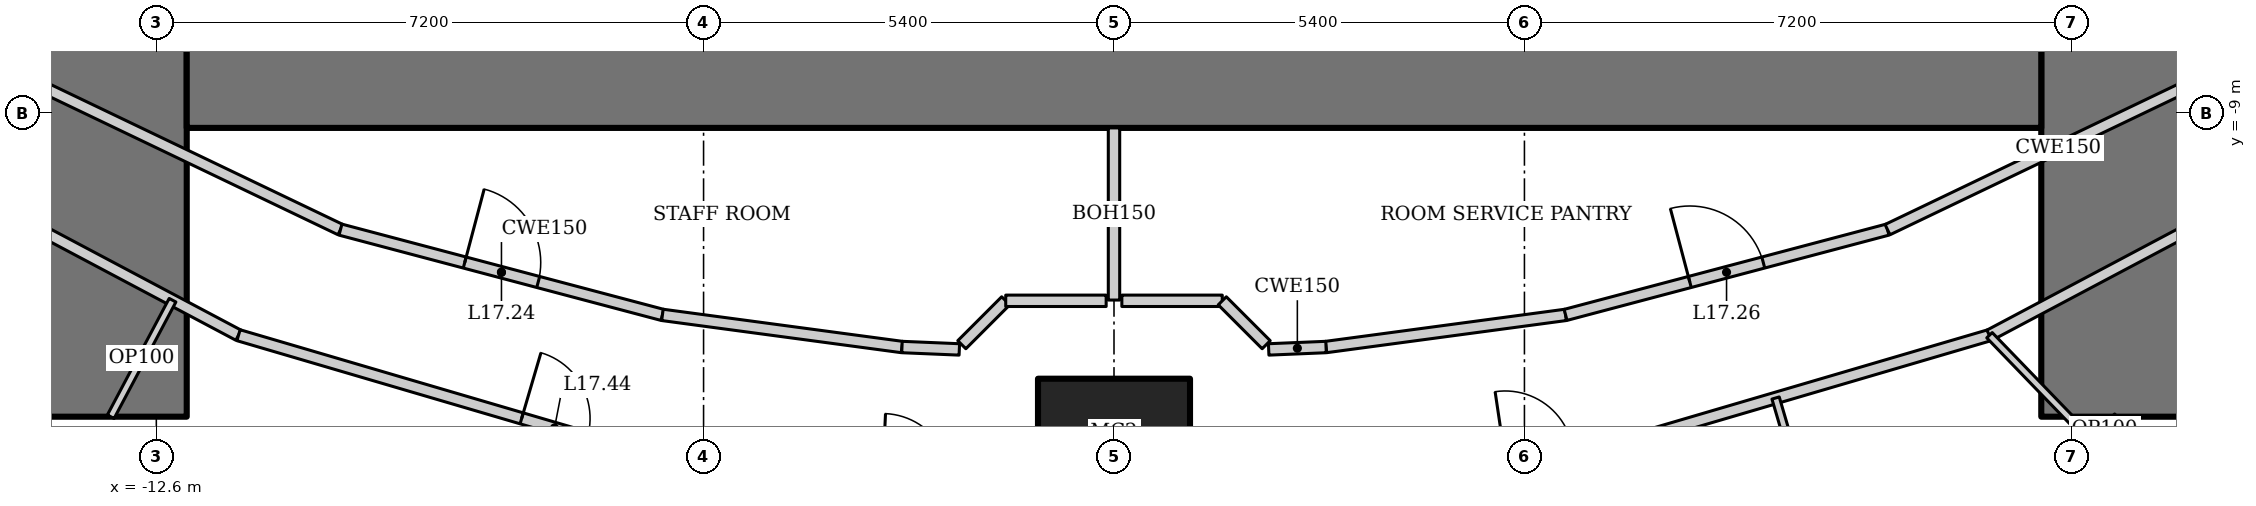
"""IFC4 building model, lengths in metres.
Left out: names, types, materials, properties, quantities, classifications, styles, units other than length and angle.
Written with IfcOpenShell. Run it as: python <this file> out.ifc"""

import sys

from ifc_helpers import new_model, si_unit, direction, frame, frame_2d, origin, origin_2d, place, context, subcontext, project, spatial, rectangle, hollow_rectangle, extrude, element, fill, save


model = new_model("IFC4")
c1 = context("Model", 3, precision=1e-05, world=origin(), true_north=direction((0.0, 1.0)))
c2 = subcontext(c1, "Body", "Model", "MODEL_VIEW")
j1 = project(units=[si_unit("LENGTHUNIT", "METRE"), si_unit("PLANEANGLEUNIT", "RADIAN")], contexts=[c1])
p1 = place(None, origin())
s1 = spatial("IfcSite", under=j1, at=p1, CompositionType="ELEMENT")
p2 = place(p1, origin())
s2 = spatial("IfcBuilding", under=s1, at=p2, CompositionType="ELEMENT")
p3 = place(p2, frame((0.0, 0.0, 76.6)))
s3 = spatial("IfcBuildingStorey", under=s2, at=p3, CompositionType="ELEMENT", Elevation=76.6)
p4 = place(p3, frame((0.0, -13.5, 0.0), z_axis=(0.0, 0.0, 1.0), x_axis=(1.0, 0.0, 0.0)))
e1 = element("IfcColumn", 1, at=p4, inside=s3, PredefinedType="COLUMN", context=c2, shape_type="SweptSolid", body=[
    extrude(hollow_rectangle(XDim=2.0, YDim=2.0, WallThickness=0.17, at=origin_2d()), origin(), (0.0, 0.0, 1.0), 3.6),
])
p5 = place(p3, frame((13.2, -13.0, 0.0), z_axis=(0.0, 0.0, 1.0), x_axis=(0.0, 1.0, 0.0)))
e2 = element("IfcWall", 2, at=p5, inside=s3, PredefinedType="SHEAR", context=c2, shape_type="SweptSolid", body=[
    extrude(rectangle(XDim=26.0, YDim=2.0, at=frame_2d((13.0, 0.0))), origin(), (0.0, 0.0, 1.0), 3.6),
])
p6 = place(p5, frame((12.1, 0.0, 0.0)))
e3 = element("IfcOpeningElement", 3, at=p6, cuts=e2, PredefinedType="OPENING", context=c2, shape_type="SweptSolid", body=[
    extrude(rectangle(XDim=1.8, YDim=2.1, at=frame_2d((0.9, 1.05))), frame((0.0, 1.01, 0.0), z_axis=(0.0, -1.0, 0.0), x_axis=(1.0, 0.0, 0.0)), (0.0, 0.0, 1.0), 2.02),
])
p7 = place(p3, frame((-13.2, 13.0, 0.0), z_axis=(0.0, 0.0, 1.0), x_axis=(0.0, -1.0, 0.0)))
e4 = element("IfcWall", 4, at=p7, inside=s3, PredefinedType="SHEAR", context=c2, shape_type="SweptSolid", body=[
    extrude(rectangle(XDim=26.0, YDim=2.0, at=frame_2d((13.0, 0.0))), origin(), (0.0, 0.0, 1.0), 3.6),
])
p8 = place(p7, frame((12.1, 0.0, 0.0)))
e5 = element("IfcOpeningElement", 5, at=p8, cuts=e4, PredefinedType="OPENING", context=c2, shape_type="SweptSolid", body=[
    extrude(rectangle(XDim=1.8, YDim=2.1, at=frame_2d((0.9, 1.05))), frame((0.0, 1.01, 0.0), z_axis=(0.0, -1.0, 0.0), x_axis=(1.0, 0.0, 0.0)), (0.0, 0.0, 1.0), 2.02),
])
p9 = place(p3, frame((-12.2, -8.0, 0.0), z_axis=(0.0, 0.0, 1.0), x_axis=(1.0, 0.0, 0.0)))
e6 = element("IfcWall", 6, at=p9, inside=s3, PredefinedType="SHEAR", context=c2, shape_type="SweptSolid", body=[
    extrude(rectangle(XDim=24.4, YDim=2.4, at=frame_2d((12.2, 0.0))), origin(), (0.0, 0.0, 1.0), 3.6),
])
p10 = place(p3, frame((-16.369, -9.354, 0.0), z_axis=(0.0, 0.0, 1.0), x_axis=(0.883334368785, -0.468743419071, 0.0)))
e7 = element("IfcWall", 7, at=p10, inside=s3, PredefinedType="PARTITIONING", context=c2, shape_type="SweptSolid", body=[
    extrude(rectangle(XDim=5.491, YDim=0.15, at=frame_2d((2.746, 0.0))), origin(), (0.0, 0.0, 1.0), 3.45),
])
p11 = place(p3, frame((-11.519, -11.928, 0.0), z_axis=(0.0, 0.0, 1.0), x_axis=(0.959496227294, -0.281721475589, 0.0)))
e8 = element("IfcWall", 8, at=p11, inside=s3, PredefinedType="PARTITIONING", context=c2, shape_type="SweptSolid", body=[
    extrude(rectangle(XDim=4.933, YDim=0.15, at=frame_2d((2.466, 0.0))), origin(), (0.0, 0.0, 1.0), 3.45),
])
p12 = place(p11, frame((3.883, 0.0, 0.0)))
e9 = element("IfcOpeningElement", 9, at=p12, cuts=e8, PredefinedType="OPENING", context=c2, shape_type="SweptSolid", body=[
    extrude(rectangle(XDim=0.9, YDim=2.1, at=frame_2d((0.45, 1.05))), frame((0.0, 0.085, 0.0), z_axis=(0.0, -1.0, 0.0), x_axis=(1.0, 0.0, 0.0)), (0.0, 0.0, 1.0), 0.17),
])
p13 = place(p3, frame((6.786, -13.317, 0.0), z_axis=(0.0, 0.0, 1.0), x_axis=(0.959496227294, 0.281721475589, 0.0)))
e10 = element("IfcWall", 10, at=p13, inside=s3, PredefinedType="PARTITIONING", context=c2, shape_type="SweptSolid", body=[
    extrude(rectangle(XDim=4.933, YDim=0.15, at=frame_2d((2.466, 0.0))), origin(), (0.0, 0.0, 1.0), 3.45),
])
p14 = place(p3, frame((11.519, -11.928, 0.0), z_axis=(0.0, 0.0, 1.0), x_axis=(0.883334368785, 0.468743419071, 0.0)))
e11 = element("IfcWall", 11, at=p14, inside=s3, PredefinedType="PARTITIONING", context=c2, shape_type="SweptSolid", body=[
    extrude(rectangle(XDim=5.491, YDim=0.15, at=frame_2d((2.746, 0.0))), origin(), (0.0, 0.0, 1.0), 3.45),
])
p15 = place(p3, frame((-14.673, -8.385, 0.0), z_axis=(0.0, 0.0, 1.0), x_axis=(0.901869692799, -0.43200816799, 0.0)))
e12 = element("IfcWall", 12, at=p15, inside=s3, PredefinedType="PARTITIONING", context=c2, shape_type="SweptSolid", body=[
    extrude(rectangle(XDim=4.986, YDim=0.15, at=frame_2d((2.493, 0.0))), origin(), (0.0, 0.0, 1.0), 3.45),
])
p16 = place(p3, frame((-10.177, -10.539, 0.0), z_axis=(0.0, 0.0, 1.0), x_axis=(0.966672790407, -0.256015070428, 0.0)))
e13 = element("IfcWall", 13, at=p16, inside=s3, PredefinedType="PARTITIONING", context=c2, shape_type="SweptSolid", body=[
    extrude(rectangle(XDim=4.382, YDim=0.15, at=frame_2d((2.191, 0.0))), origin(), (0.0, 0.0, 1.0), 3.45),
])
p17 = place(p16, frame((1.691, 0.0, 0.0)))
e14 = element("IfcOpeningElement", 14, at=p17, cuts=e13, PredefinedType="OPENING", context=c2, shape_type="SweptSolid", body=[
    extrude(rectangle(XDim=1.0, YDim=2.1, at=frame_2d((0.5, 1.05))), frame((0.0, 0.085, 0.0), z_axis=(0.0, -1.0, 0.0), x_axis=(1.0, 0.0, 0.0)), (0.0, 0.0, 1.0), 0.17),
])
for number, where, z_axis, x_axis in (
    (15, (-5.941, -11.66, 0.0), (0.0, 0.0, 1.0), (0.991, -0.133, 0.0)),
    (16, (2.79, -12.083, 0.0), (0.0, 0.0, 1.0), (0.991, 0.133, 0.0)),
):
    element("IfcWall", number, at=place(p3, frame(where, z_axis=z_axis, x_axis=x_axis)), inside=s3, PredefinedType="PARTITIONING", context=c2, shape_type="SweptSolid", body=[
        extrude(rectangle(XDim=3.18, YDim=0.15, at=frame_2d((1.59, 0.0))), origin(), (0.0, 0.0, 1.0), 3.45),
    ])
p18 = place(p3, frame((5.941, -11.66, 0.0), z_axis=(0.0, 0.0, 1.0), x_axis=(0.966672790407, 0.256015070428, 0.0)))
e17 = element("IfcWall", 17, at=p18, inside=s3, PredefinedType="PARTITIONING", context=c2, shape_type="SweptSolid", body=[
    extrude(rectangle(XDim=4.382, YDim=0.15, at=frame_2d((2.191, 0.0))), origin(), (0.0, 0.0, 1.0), 3.45),
])
p19 = place(p18, frame((1.691, 0.0, 0.0)))
e18 = element("IfcOpeningElement", 18, at=p19, cuts=e17, PredefinedType="OPENING", context=c2, shape_type="SweptSolid", body=[
    extrude(rectangle(XDim=1.0, YDim=2.1, at=frame_2d((0.5, 1.05))), frame((0.0, 0.085, 0.0), z_axis=(0.0, -1.0, 0.0), x_axis=(1.0, 0.0, 0.0)), (0.0, 0.0, 1.0), 0.17),
])
p20 = place(p3, frame((10.177, -10.539, 0.0), z_axis=(0.0, 0.0, 1.0), x_axis=(0.901869692799, 0.43200816799, 0.0)))
e19 = element("IfcWall", 19, at=p20, inside=s3, PredefinedType="PARTITIONING", context=c2, shape_type="SweptSolid", body=[
    extrude(rectangle(XDim=4.986, YDim=0.15, at=frame_2d((2.493, 0.0))), origin(), (0.0, 0.0, 1.0), 3.45),
])
p21 = place(p3, frame((8.705, -12.754, 0.0), z_axis=(0.0, 0.0, 1.0), x_axis=(0.281659633817, -0.959514382736, 0.0)))
e20 = element("IfcWall", 20, at=p21, inside=s3, PredefinedType="PARTITIONING", context=c2, shape_type="SweptSolid", body=[
    extrude(rectangle(XDim=2.4, YDim=0.1, at=frame_2d((1.2, 0.0))), origin(), (0.0, 0.0, 1.0), 3.45),
])
p22 = place(p21, frame((0.7, 0.0, 0.0)))
e21 = element("IfcOpeningElement", 21, at=p22, cuts=e20, PredefinedType="OPENING", context=c2, shape_type="SweptSolid", body=[
    extrude(rectangle(XDim=0.8, YDim=2.1, at=frame_2d((0.4, 1.05))), frame((0.0, 0.06, 0.0), z_axis=(0.0, -1.0, 0.0), x_axis=(1.0, 0.0, 0.0)), (0.0, 0.0, 1.0), 0.12),
])
p23 = place(p3, frame((16.944, -17.545, 0.0), z_axis=(0.0, 0.0, 1.0), x_axis=(-0.694666479492, 0.719331969448, 0.0)))
e22 = element("IfcWall", 22, at=p23, inside=s3, PredefinedType="PARTITIONING", context=c2, shape_type="SweptSolid", body=[
    extrude(rectangle(XDim=7.81, YDim=0.1, at=frame_2d((3.905, 0.0))), origin(), (0.0, 0.0, 1.0), 2.528),
])
p24 = place(p23, frame((3.455, 0.0, 0.0)))
e23 = element("IfcOpeningElement", 23, at=p24, cuts=e22, PredefinedType="OPENING", context=c2, shape_type="SweptSolid", body=[
    extrude(rectangle(XDim=0.9, YDim=2.1, at=frame_2d((0.45, 1.05))), frame((0.0, 0.06, 0.0), z_axis=(0.0, -1.0, 0.0), x_axis=(1.0, 0.0, 0.0)), (0.0, 0.0, 1.0), 0.12),
])
p25 = place(p3, frame((13.2, -13.0, 0.0), z_axis=(0.0, 0.0, 1.0), x_axis=(-0.719347134512, -0.69465077562, 0.0)))
e24 = element("IfcWall", 24, at=p25, inside=s3, PredefinedType="PARTITIONING", context=c2, shape_type="SweptSolid", body=[
    extrude(rectangle(XDim=0.465, YDim=0.1, at=frame_2d((0.232, 0.0))), origin(), (0.0, 0.0, 1.0), 3.45),
])
p26 = place(p3, frame((-13.2, -13.0, 0.0), z_axis=(0.0, 0.0, 1.0), x_axis=(0.46874717052, 0.88333237806, 0.0)))
e25 = element("IfcWall", 25, at=p26, inside=s3, PredefinedType="PARTITIONING", context=c2, shape_type="SweptSolid", body=[
    extrude(rectangle(XDim=1.735, YDim=0.1, at=frame_2d((0.868, 0.0))), origin(), (0.0, 0.0, 1.0), 3.45),
])
for number, where, z_axis, x_axis in (
    (26, (-2.79, -12.083, 0.0), (0.0, 0.0, 1.0), (0.999, -0.042, 0.0)),
    (27, (2.035, -12.115, 0.0), (0.0, 0.0, 1.0), (0.999, 0.042, 0.0)),
):
    element("IfcWall", number, at=place(p3, frame(where, z_axis=z_axis, x_axis=x_axis)), inside=s3, PredefinedType="PARTITIONING", context=c2, shape_type="SweptSolid", body=[
        extrude(rectangle(XDim=0.755, YDim=0.15, at=frame_2d((0.378, 0.0))), origin(), (0.0, 0.0, 1.0), 3.45),
    ])
p27 = place(p3, frame((0.0, -9.2, 0.0), z_axis=(0.0, 0.0, 1.0), x_axis=(0.0, -1.0, 0.0)))
e28 = element("IfcWall", 28, at=p27, inside=s3, PredefinedType="PARTITIONING", context=c2, shape_type="SweptSolid", body=[
    extrude(rectangle(XDim=2.265, YDim=0.15, at=frame_2d((1.133, 0.0))), origin(), (0.0, 0.0, 1.0), 3.043),
])
p28 = place(p3, frame((-2.002, -12.053, 0.0), z_axis=(0.0, 0.0, 1.0), x_axis=(0.707256164678, 0.706957366129, 0.0)))
e29 = element("IfcWall", 29, at=p28, inside=s3, PredefinedType="PARTITIONING", context=c2, shape_type="SweptSolid", body=[
    extrude(rectangle(XDim=0.817, YDim=0.15, at=frame_2d((0.409, 0.0))), origin(), (0.0, 0.0, 1.0), 3.45),
])
for number, where, z_axis, x_axis in (
    (30, (-1.425, -11.475, 0.0), (0.0, 0.0, 1.0), (1.0, 0.0, 0.0)),
    (31, (0.103, -11.475, 0.0), (0.0, 0.0, 1.0), (1.0, 0.0, 0.0)),
):
    element("IfcWall", number, at=place(p3, frame(where, z_axis=z_axis, x_axis=x_axis)), inside=s3, PredefinedType="PARTITIONING", context=c2, shape_type="SweptSolid", body=[
        extrude(rectangle(XDim=1.321, YDim=0.15, at=frame_2d((0.661, 0.0))), origin(), (0.0, 0.0, 1.0), 3.45),
    ])
p29 = place(p3, frame((1.425, -11.475, 0.0), z_axis=(0.0, 0.0, 1.0), x_axis=(0.707256164678, -0.706957366129, 0.0)))
e32 = element("IfcWall", 32, at=p29, inside=s3, PredefinedType="PARTITIONING", context=c2, shape_type="SweptSolid", body=[
    extrude(rectangle(XDim=0.817, YDim=0.15, at=frame_2d((0.409, 0.0))), origin(), (0.0, 0.0, 1.0), 3.45),
])
p30 = place(p17, origin())
e33 = element("IfcDoor", 33, at=p30, inside=s3, OperationType="SINGLE_SWING_LEFT", PredefinedType="DOOR", context=c2, shape_type="SweptSolid", body=[
    extrude(rectangle(XDim=1.0, YDim=2.1, at=frame_2d((0.5, 1.05))), frame((0.0, 0.025, 0.0), z_axis=(0.0, -1.0, 0.0), x_axis=(1.0, 0.0, 0.0)), (0.0, 0.0, 1.0), 0.05),
])
fill(e14, e33)
p31 = place(p19, origin())
e34 = element("IfcDoor", 34, at=p31, inside=s3, OperationType="SINGLE_SWING_LEFT", PredefinedType="DOOR", context=c2, shape_type="SweptSolid", body=[
    extrude(rectangle(XDim=1.0, YDim=2.1, at=frame_2d((0.5, 1.05))), frame((0.0, 0.025, 0.0), z_axis=(0.0, -1.0, 0.0), x_axis=(1.0, 0.0, 0.0)), (0.0, 0.0, 1.0), 0.05),
])
fill(e18, e34)
p32 = place(p12, origin())
e35 = element("IfcDoor", 35, at=p32, inside=s3, OperationType="SINGLE_SWING_LEFT", PredefinedType="DOOR", context=c2, shape_type="SweptSolid", body=[
    extrude(rectangle(XDim=0.9, YDim=2.1, at=frame_2d((0.45, 1.05))), frame((0.0, 0.025, 0.0), z_axis=(0.0, -1.0, 0.0), x_axis=(1.0, 0.0, 0.0)), (0.0, 0.0, 1.0), 0.05),
])
fill(e9, e35)
save(model, sys.argv[1])
